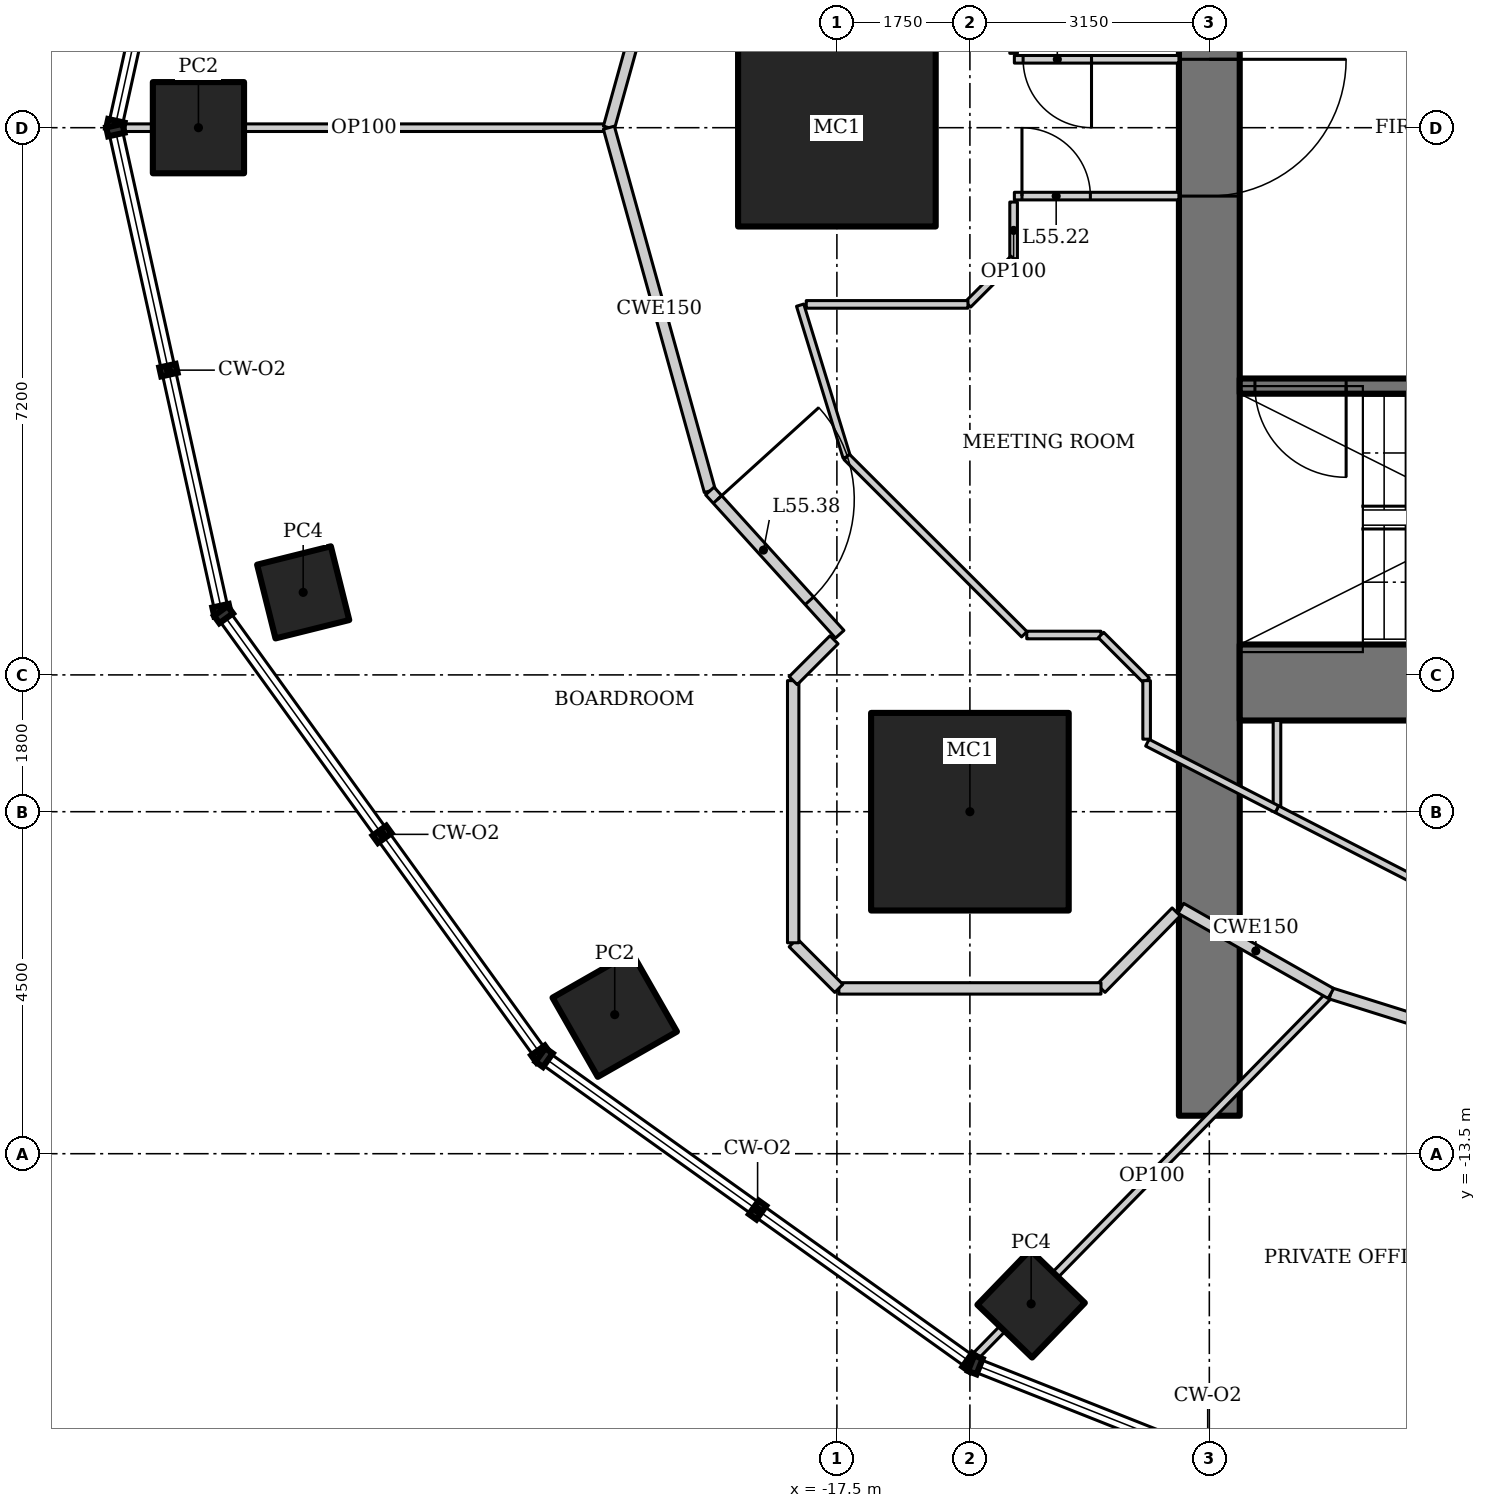
"""IFC4 building model, lengths in metres.
Left out: names, types, materials, properties, quantities, classifications, styles, units other than length and angle.
Written with IfcOpenShell. Run it as: python <this file> out.ifc"""

import sys

from ifc_helpers import new_model, si_unit, direction, frame, frame_2d, origin, origin_2d, place, context, subcontext, project, spatial, rectangle, hollow_rectangle, extrude, element, fill, save


model = new_model("IFC4")
c1 = context("Model", 3, precision=1e-05, world=origin(), true_north=direction((0.0, 1.0)))
c2 = subcontext(c1, "Body", "Model", "MODEL_VIEW")
j1 = project(units=[si_unit("LENGTHUNIT", "METRE"), si_unit("PLANEANGLEUNIT", "RADIAN")], contexts=[c1])
p1 = place(None, origin())
s1 = spatial("IfcSite", under=j1, at=p1, CompositionType="ELEMENT")
p2 = place(p1, origin())
s2 = spatial("IfcBuilding", under=s1, at=p2, CompositionType="ELEMENT")
p3 = place(p2, frame((0.0, 0.0, 236.8)))
s3 = spatial("IfcBuildingStorey", under=s2, at=p3, CompositionType="ELEMENT", Elevation=236.8)
for number, where, z_axis, x_axis in (
    (1, (-17.5, 0.0, 0.0), (0.0, 0.0, 1.0), (1.0, 0.0, 0.0)),
    (2, (-15.75, -9.0, 0.0), (0.0, 0.0, 1.0), (1.0, 0.0, 0.0)),
):
    element("IfcColumn", number, at=place(p3, frame(where, z_axis=z_axis, x_axis=x_axis)), inside=s3, PredefinedType="COLUMN", context=c2, shape_type="SweptSolid", body=[
        extrude(hollow_rectangle(XDim=2.6, YDim=2.6, WallThickness=0.13, at=origin_2d()), origin(), (0.0, 0.0, 1.0), 4.2),
    ])
p4 = place(p3, frame((-25.9, 0.0, 0.0), z_axis=(0.0, 0.0, 1.0), x_axis=(1.0, 0.0, 0.0)))
e3 = element("IfcColumn", 3, at=p4, inside=s3, PredefinedType="COLUMN", context=c2, shape_type="SweptSolid", body=[
    extrude(hollow_rectangle(XDim=1.2, YDim=1.2, WallThickness=0.1, at=origin_2d()), origin(), (0.0, 0.0, 1.0), 4.2),
])
p5 = place(p3, frame((-24.522, -6.114, 0.0), z_axis=(0.0, 0.0, 1.0), x_axis=(0.970295726276, 0.2419218956, 0.0)))
e4 = element("IfcColumn", 4, at=p5, inside=s3, PredefinedType="COLUMN", context=c2, shape_type="SweptSolid", body=[
    extrude(hollow_rectangle(XDim=1.0, YDim=1.0, WallThickness=0.08, at=origin_2d()), origin(), (0.0, 0.0, 1.0), 4.2),
])
p6 = place(p3, frame((-20.423, -11.67, 0.0), z_axis=(0.0, 0.0, 1.0), x_axis=(0.86824298017, 0.496139221777, 0.0)))
e5 = element("IfcColumn", 5, at=p6, inside=s3, PredefinedType="COLUMN", context=c2, shape_type="SweptSolid", body=[
    extrude(hollow_rectangle(XDim=1.2, YDim=1.2, WallThickness=0.1, at=origin_2d()), origin(), (0.0, 0.0, 1.0), 4.2),
])
p7 = place(p3, frame((-14.944, -15.475, 0.0), z_axis=(0.0, 0.0, 1.0), x_axis=(0.694658370459, 0.719339800339, 0.0)))
e6 = element("IfcColumn", 6, at=p7, inside=s3, PredefinedType="COLUMN", context=c2, shape_type="SweptSolid", body=[
    extrude(hollow_rectangle(XDim=1.0, YDim=1.0, WallThickness=0.08, at=origin_2d()), origin(), (0.0, 0.0, 1.0), 4.2),
])
p8 = place(p3, frame((-12.6, 13.0, 0.0), z_axis=(0.0, 0.0, 1.0), x_axis=(0.0, -1.0, 0.0)))
e7 = element("IfcWall", 7, at=p8, inside=s3, PredefinedType="SHEAR", context=c2, shape_type="SweptSolid", body=[
    extrude(rectangle(XDim=26.0, YDim=0.8, at=frame_2d((13.0, 0.0))), origin(), (0.0, 0.0, 1.0), 4.2),
])
p9 = place(p8, frame((12.1, 0.0, 0.0)))
e8 = element("IfcOpeningElement", 8, at=p9, cuts=e7, PredefinedType="OPENING", context=c2, shape_type="SweptSolid", body=[
    extrude(rectangle(XDim=1.8, YDim=2.1, at=frame_2d((0.9, 1.05))), frame((0.0, 0.41, 0.0), z_axis=(0.0, -1.0, 0.0), x_axis=(1.0, 0.0, 0.0)), (0.0, 0.0, 1.0), 0.82),
])
p10 = place(p3, frame((-12.2, -7.3, 0.0), z_axis=(0.0, 0.0, 1.0), x_axis=(1.0, 0.0, 0.0)))
e9 = element("IfcWall", 9, at=p10, inside=s3, PredefinedType="SHEAR", context=c2, shape_type="SweptSolid", body=[
    extrude(rectangle(XDim=24.4, YDim=1.0, at=frame_2d((12.2, 0.0))), origin(), (0.0, 0.0, 1.0), 4.2),
])
p11 = place(p3, frame((-5.6, -3.4, 0.0), z_axis=(0.0, 0.0, 1.0), x_axis=(-1.0, 0.0, 0.0)))
e10 = element("IfcWall", 10, at=p11, inside=s3, PredefinedType="SHEAR", context=c2, shape_type="SweptSolid", body=[
    extrude(rectangle(XDim=6.6, YDim=0.2, at=frame_2d((3.3, 0.0))), origin(), (0.0, 0.0, 1.0), 4.2),
])
p12 = place(p11, frame((5.2, 0.0, 0.0)))
e11 = element("IfcOpeningElement", 11, at=p12, cuts=e10, PredefinedType="OPENING", context=c2, shape_type="SweptSolid", body=[
    extrude(rectangle(XDim=1.2, YDim=2.1, at=frame_2d((0.6, 1.05))), frame((0.0, 0.11, 0.0), z_axis=(0.0, -1.0, 0.0), x_axis=(1.0, 0.0, 0.0)), (0.0, 0.0, 1.0), 0.22),
])
p13 = place(p3, frame((-26.944, 0.0, 0.0), z_axis=(0.0, 0.0, 1.0), x_axis=(1.0, 0.0, 0.0)))
e12 = element("IfcWall", 12, at=p13, inside=s3, PredefinedType="PARTITIONING", context=c2, shape_type="SweptSolid", body=[
    extrude(rectangle(XDim=6.444, YDim=0.1, at=frame_2d((3.222, 0.0))), origin(), (0.0, 0.0, 1.0), 3.349),
])
p14 = place(p3, frame((-15.709, -16.199, 0.0), z_axis=(0.0, 0.0, 1.0), x_axis=(0.699758297028, 0.71437967898, 0.0)))
e13 = element("IfcWall", 13, at=p14, inside=s3, PredefinedType="PARTITIONING", context=c2, shape_type="SweptSolid", body=[
    extrude(rectangle(XDim=6.729, YDim=0.1, at=frame_2d((3.365, 0.0))), origin(), (0.0, 0.0, 1.0), 3.41),
])
for number, where, z_axis, x_axis in (
    (14, (-19.172, 4.78, 0.0), (0.0, 0.0, 1.0), (-0.268, -0.964, 0.0)),
    (15, (-20.5, 0.0, 0.0), (0.0, 0.0, 1.0), (0.268, -0.964, 0.0)),
):
    element("IfcWall", number, at=place(p3, frame(where, z_axis=z_axis, x_axis=x_axis)), inside=s3, PredefinedType="PARTITIONING", context=c2, shape_type="SweptSolid", body=[
        extrude(rectangle(XDim=4.961, YDim=0.15, at=frame_2d((2.48, 0.0))), origin(), (0.0, 0.0, 1.0), 4.05),
    ])
p15 = place(p3, frame((-11.001, -11.392, 0.0), z_axis=(0.0, 0.0, 1.0), x_axis=(0.954031103669, -0.299707612903, 0.0)))
e16 = element("IfcWall", 16, at=p15, inside=s3, PredefinedType="PARTITIONING", context=c2, shape_type="SweptSolid", body=[
    extrude(rectangle(XDim=4.695, YDim=0.15, at=frame_2d((2.348, 0.0))), origin(), (0.0, 0.0, 1.0), 4.05),
])
p16 = place(p15, frame((2.0, 0.0, 0.0)))
e17 = element("IfcOpeningElement", 17, at=p16, cuts=e16, PredefinedType="OPENING", context=c2, shape_type="SweptSolid", body=[
    extrude(rectangle(XDim=0.9, YDim=2.1, at=frame_2d((0.45, 1.05))), frame((0.0, 0.085, 0.0), z_axis=(0.0, -1.0, 0.0), x_axis=(1.0, 0.0, 0.0)), (0.0, 0.0, 1.0), 0.17),
])
p17 = place(p3, frame((-11.71, -7.8, 0.0), z_axis=(0.0, 0.0, 1.0), x_axis=(0.0, -1.0, 0.0)))
e18 = element("IfcWall", 18, at=p17, inside=s3, PredefinedType="PARTITIONING", context=c2, shape_type="SweptSolid", body=[
    extrude(rectangle(XDim=1.167, YDim=0.1, at=frame_2d((0.583, 0.0))), origin(), (0.0, 0.0, 1.0), 4.05),
])
p18 = place(p3, frame((-9.67, -10.014, 0.0), z_axis=(0.0, 0.0, 1.0), x_axis=(-0.889605609385, 0.456729525814, 0.0)))
e19 = element("IfcWall", 19, at=p18, inside=s3, PredefinedType="PARTITIONING", context=c2, shape_type="SweptSolid", body=[
    extrude(rectangle(XDim=2.293, YDim=0.1, at=frame_2d((1.146, 0.0))), origin(), (0.0, 0.0, 1.0), 4.05),
])
p19 = place(p3, frame((-17.372, -4.331, 0.0), z_axis=(0.0, 0.0, 1.0), x_axis=(-0.293231279211, 0.956041535129, 0.0)))
e20 = element("IfcWall", 20, at=p19, inside=s3, PredefinedType="PARTITIONING", context=c2, shape_type="SweptSolid", body=[
    extrude(rectangle(XDim=2.088, YDim=0.1, at=frame_2d((1.044, 0.0))), origin(), (0.0, 0.0, 1.0), 4.05),
])
p20 = place(p3, frame((-15.165, -0.9, 0.0), z_axis=(0.0, 0.0, 1.0), x_axis=(1.0, 0.0, 0.0)))
e21 = element("IfcWall", 21, at=p20, inside=s3, PredefinedType="PARTITIONING", context=c2, shape_type="SweptSolid", body=[
    extrude(rectangle(XDim=2.165, YDim=0.1, at=frame_2d((1.083, 0.0))), origin(), (0.0, 0.0, 1.0), 4.05),
])
p21 = place(p20, frame((0.1, 0.0, 0.0)))
e22 = element("IfcOpeningElement", 22, at=p21, cuts=e21, PredefinedType="OPENING", context=c2, shape_type="SweptSolid", body=[
    extrude(rectangle(XDim=0.9, YDim=2.1, at=frame_2d((0.45, 1.05))), frame((0.0, 0.06, 0.0), z_axis=(0.0, -1.0, 0.0), x_axis=(1.0, 0.0, 0.0)), (0.0, 0.0, 1.0), 0.12),
])
p22 = place(p3, frame((-13.0, 0.9, 0.0), z_axis=(0.0, 0.0, 1.0), x_axis=(-1.0, 0.0, 0.0)))
e23 = element("IfcWall", 23, at=p22, inside=s3, PredefinedType="PARTITIONING", context=c2, shape_type="SweptSolid", body=[
    extrude(rectangle(XDim=2.165, YDim=0.1, at=frame_2d((1.083, 0.0))), origin(), (0.0, 0.0, 1.0), 4.05),
])
p23 = place(p22, frame((1.15, 0.0, 0.0)))
e24 = element("IfcOpeningElement", 24, at=p23, cuts=e23, PredefinedType="OPENING", context=c2, shape_type="SweptSolid", body=[
    extrude(rectangle(XDim=0.9, YDim=2.1, at=frame_2d((0.45, 1.05))), frame((0.0, 0.06, 0.0), z_axis=(0.0, -1.0, 0.0), x_axis=(1.0, 0.0, 0.0)), (0.0, 0.0, 1.0), 0.12),
])
p24 = place(p3, frame((-15.175, -0.978, 0.0), z_axis=(0.0, 0.0, 1.0), x_axis=(0.0, -1.0, 0.0)))
e25 = element("IfcWall", 25, at=p24, inside=s3, PredefinedType="PARTITIONING", context=c2, shape_type="SweptSolid", body=[
    extrude(rectangle(XDim=0.746, YDim=0.1, at=frame_2d((0.373, 0.0))), origin(), (0.0, 0.0, 1.0), 4.05),
])
p25 = place(p3, frame((-15.175, -1.725, 0.0), z_axis=(0.0, 0.0, 1.0), x_axis=(-0.707106781187, -0.707106781187, 0.0)))
e26 = element("IfcWall", 26, at=p25, inside=s3, PredefinedType="PARTITIONING", context=c2, shape_type="SweptSolid", body=[
    extrude(rectangle(XDim=0.849, YDim=0.1, at=frame_2d((0.425, 0.0))), origin(), (0.0, 0.0, 1.0), 4.05),
])
p26 = place(p3, frame((-15.775, -2.325, 0.0), z_axis=(0.0, 0.0, 1.0), x_axis=(-1.0, 0.0, 0.0)))
e27 = element("IfcWall", 27, at=p26, inside=s3, PredefinedType="PARTITIONING", context=c2, shape_type="SweptSolid", body=[
    extrude(rectangle(XDim=2.128, YDim=0.1, at=frame_2d((1.064, 0.0))), origin(), (0.0, 0.0, 1.0), 4.05),
])
p27 = place(p3, frame((-15.175, 1.725, 0.0), z_axis=(0.0, 0.0, 1.0), x_axis=(0.0, -1.0, 0.0)))
e28 = element("IfcWall", 28, at=p27, inside=s3, PredefinedType="PARTITIONING", context=c2, shape_type="SweptSolid", body=[
    extrude(rectangle(XDim=0.746, YDim=0.1, at=frame_2d((0.373, 0.0))), origin(), (0.0, 0.0, 1.0), 4.05),
])
p28 = place(p3, frame((-19.172, -4.78, 0.0), z_axis=(0.0, 0.0, 1.0), x_axis=(0.671721890643, -0.74080341632, 0.0)))
e29 = element("IfcWall", 29, at=p28, inside=s3, PredefinedType="PARTITIONING", context=c2, shape_type="SweptSolid", body=[
    extrude(rectangle(XDim=2.544, YDim=0.15, at=frame_2d((1.272, 0.0))), origin(), (0.0, 0.0, 1.0), 4.05),
])
p29 = place(p28, frame((0.15, 0.0, 0.0)))
e30 = element("IfcOpeningElement", 30, at=p29, cuts=e29, PredefinedType="OPENING", context=c2, shape_type="SweptSolid", body=[
    extrude(rectangle(XDim=1.8, YDim=2.1, at=frame_2d((0.9, 1.05))), frame((0.0, 0.085, 0.0), z_axis=(0.0, -1.0, 0.0), x_axis=(1.0, 0.0, 0.0)), (0.0, 0.0, 1.0), 0.17),
])
p30 = place(p3, frame((-12.975, -10.271, 0.0), z_axis=(0.0, 0.0, 1.0), x_axis=(0.869722107117, -0.493541747366, 0.0)))
e31 = element("IfcWall", 31, at=p30, inside=s3, PredefinedType="PARTITIONING", context=c2, shape_type="SweptSolid", body=[
    extrude(rectangle(XDim=2.27, YDim=0.15, at=frame_2d((1.135, 0.0))), origin(), (0.0, 0.0, 1.0), 4.05),
])
p31 = place(p3, frame((-11.71, -8.967, 0.0), z_axis=(0.0, 0.0, 1.0), x_axis=(-0.889638356137, 0.456665736935, 0.0)))
e32 = element("IfcWall", 32, at=p31, inside=s3, PredefinedType="PARTITIONING", context=c2, shape_type="SweptSolid", body=[
    extrude(rectangle(XDim=1.917, YDim=0.1, at=frame_2d((0.958, 0.0))), origin(), (0.0, 0.0, 1.0), 4.05),
])
p32 = place(p3, frame((-15.035, -6.665, 0.0), z_axis=(0.0, 0.0, 1.0), x_axis=(-0.707587114823, 0.70662612104, 0.0)))
e33 = element("IfcWall", 33, at=p32, inside=s3, PredefinedType="PARTITIONING", context=c2, shape_type="SweptSolid", body=[
    extrude(rectangle(XDim=3.303, YDim=0.1, at=frame_2d((1.651, 0.0))), origin(), (0.0, 0.0, 1.0), 4.05),
])
p33 = place(p3, frame((-15.002, -6.675, 0.0), z_axis=(0.0, 0.0, 1.0), x_axis=(1.0, 0.0, 0.0)))
e34 = element("IfcWall", 34, at=p33, inside=s3, PredefinedType="PARTITIONING", context=c2, shape_type="SweptSolid", body=[
    extrude(rectangle(XDim=0.977, YDim=0.1, at=frame_2d((0.488, 0.0))), origin(), (0.0, 0.0, 1.0), 4.05),
])
p34 = place(p3, frame((-14.025, -6.675, 0.0), z_axis=(0.0, 0.0, 1.0), x_axis=(0.707106781187, -0.707106781187, 0.0)))
e35 = element("IfcWall", 35, at=p34, inside=s3, PredefinedType="PARTITIONING", context=c2, shape_type="SweptSolid", body=[
    extrude(rectangle(XDim=0.849, YDim=0.1, at=frame_2d((0.425, 0.0))), origin(), (0.0, 0.0, 1.0), 4.05),
])
p35 = place(p3, frame((-13.425, -7.275, 0.0), z_axis=(0.0, 0.0, 1.0), x_axis=(0.0, -1.0, 0.0)))
e36 = element("IfcWall", 36, at=p35, inside=s3, PredefinedType="PARTITIONING", context=c2, shape_type="SweptSolid", body=[
    extrude(rectangle(XDim=0.77, YDim=0.1, at=frame_2d((0.385, 0.0))), origin(), (0.0, 0.0, 1.0), 4.05),
])
p36 = place(p3, frame((-13.036, -10.319, 0.0), z_axis=(0.0, 0.0, 1.0), x_axis=(-0.701113567316, -0.713049623606, 0.0)))
e37 = element("IfcWall", 37, at=p36, inside=s3, PredefinedType="PARTITIONING", context=c2, shape_type="SweptSolid", body=[
    extrude(rectangle(XDim=1.411, YDim=0.15, at=frame_2d((0.706, 0.0))), origin(), (0.0, 0.0, 1.0), 4.05),
])
p37 = place(p3, frame((-14.025, -11.325, 0.0), z_axis=(0.0, 0.0, 1.0), x_axis=(-1.0, 0.0, 0.0)))
e38 = element("IfcWall", 38, at=p37, inside=s3, PredefinedType="PARTITIONING", context=c2, shape_type="SweptSolid", body=[
    extrude(rectangle(XDim=3.449, YDim=0.15, at=frame_2d((1.725, 0.0))), origin(), (0.0, 0.0, 1.0), 4.05),
])
p38 = place(p3, frame((-17.475, -11.325, 0.0), z_axis=(0.0, 0.0, 1.0), x_axis=(-0.707106781187, 0.707106781187, 0.0)))
e39 = element("IfcWall", 39, at=p38, inside=s3, PredefinedType="PARTITIONING", context=c2, shape_type="SweptSolid", body=[
    extrude(rectangle(XDim=0.849, YDim=0.15, at=frame_2d((0.425, 0.0))), origin(), (0.0, 0.0, 1.0), 4.05),
])
p39 = place(p3, frame((-18.075, -10.725, 0.0), z_axis=(0.0, 0.0, 1.0), x_axis=(0.0, 1.0, 0.0)))
e40 = element("IfcWall", 40, at=p39, inside=s3, PredefinedType="PARTITIONING", context=c2, shape_type="SweptSolid", body=[
    extrude(rectangle(XDim=3.449, YDim=0.15, at=frame_2d((1.725, 0.0))), origin(), (0.0, 0.0, 1.0), 3.6),
])
p40 = place(p3, frame((-18.075, -7.275, 0.0), z_axis=(0.0, 0.0, 1.0), x_axis=(0.707106781187, 0.707106781187, 0.0)))
e41 = element("IfcWall", 41, at=p40, inside=s3, PredefinedType="PARTITIONING", context=c2, shape_type="SweptSolid", body=[
    extrude(rectangle(XDim=0.76, YDim=0.15, at=frame_2d((0.38, 0.0))), origin(), (0.0, 0.0, 1.0), 4.05),
])
p41 = place(p12, origin())
e42 = element("IfcDoor", 42, at=p41, inside=s3, OperationType="SINGLE_SWING_RIGHT", PredefinedType="DOOR", context=c2, shape_type="SweptSolid", body=[
    extrude(rectangle(XDim=1.2, YDim=2.1, at=frame_2d((0.6, 1.05))), frame((0.0, 0.025, 0.0), z_axis=(0.0, -1.0, 0.0), x_axis=(1.0, 0.0, 0.0)), (0.0, 0.0, 1.0), 0.05),
])
fill(e11, e42)
p42 = place(p9, origin())
e43 = element("IfcDoor", 43, at=p42, inside=s3, OperationType="DOUBLE_DOOR_DOUBLE_SWING", PredefinedType="DOOR", context=c2, shape_type="SweptSolid", body=[
    extrude(rectangle(XDim=1.8, YDim=2.1, at=frame_2d((0.9, 1.05))), frame((0.0, 0.025, 0.0), z_axis=(0.0, -1.0, 0.0), x_axis=(1.0, 0.0, 0.0)), (0.0, 0.0, 1.0), 0.05),
])
fill(e8, e43)
p43 = place(p21, origin())
e44 = element("IfcDoor", 44, at=p43, inside=s3, OperationType="SINGLE_SWING_LEFT", PredefinedType="DOOR", context=c2, shape_type="SweptSolid", body=[
    extrude(rectangle(XDim=0.9, YDim=2.1, at=frame_2d((0.45, 1.05))), frame((0.0, 0.025, 0.0), z_axis=(0.0, -1.0, 0.0), x_axis=(1.0, 0.0, 0.0)), (0.0, 0.0, 1.0), 0.05),
])
fill(e22, e44)
p44 = place(p23, origin())
e45 = element("IfcDoor", 45, at=p44, inside=s3, OperationType="SINGLE_SWING_LEFT", PredefinedType="DOOR", context=c2, shape_type="SweptSolid", body=[
    extrude(rectangle(XDim=0.9, YDim=2.1, at=frame_2d((0.45, 1.05))), frame((0.0, 0.025, 0.0), z_axis=(0.0, -1.0, 0.0), x_axis=(1.0, 0.0, 0.0)), (0.0, 0.0, 1.0), 0.05),
])
fill(e24, e45)
p45 = place(p29, origin())
e46 = element("IfcDoor", 46, at=p45, inside=s3, OperationType="DOUBLE_DOOR_DOUBLE_SWING", PredefinedType="DOOR", context=c2, shape_type="SweptSolid", body=[
    extrude(rectangle(XDim=1.8, YDim=2.1, at=frame_2d((0.9, 1.05))), frame((0.0, 0.025, 0.0), z_axis=(0.0, -1.0, 0.0), x_axis=(1.0, 0.0, 0.0)), (0.0, 0.0, 1.0), 0.05),
])
fill(e30, e46)
save(model, sys.argv[1])
